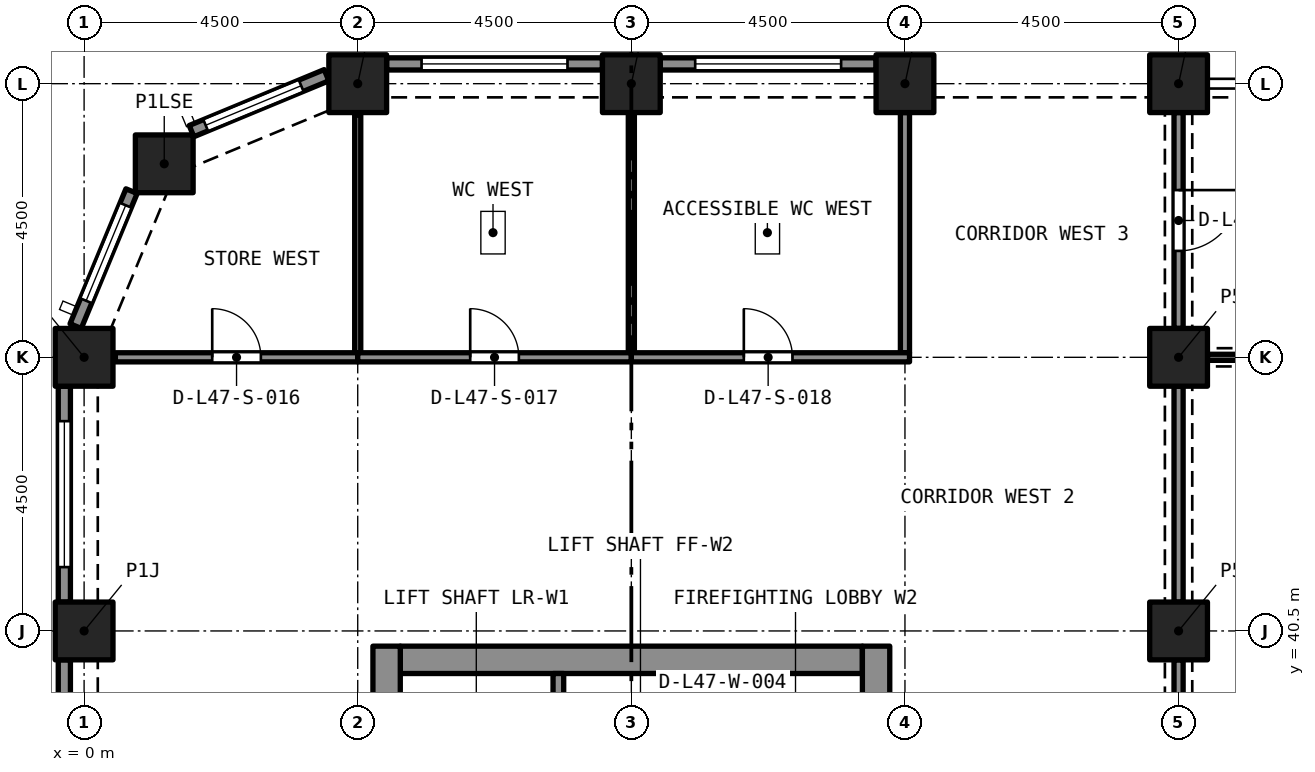
"""IFC4 building model, lengths in metres.
Left out: names, types, materials, properties, quantities, classifications, styles, units other than length and angle.
Written with IfcOpenShell. Run it as: python <this file> out.ifc"""

import sys

from ifc_helpers import new_model, si_unit, direction, frame, frame_2d, origin, origin_2d, place, context, subcontext, project, spatial, rectangle, extrude, element, fill, save


model = new_model("IFC4")
c1 = context("Model", 3, precision=1e-05, world=origin(), true_north=direction((0.0, 1.0)))
c2 = subcontext(c1, "Body", "Model", "MODEL_VIEW")
j1 = project(units=[si_unit("LENGTHUNIT", "METRE"), si_unit("PLANEANGLEUNIT", "RADIAN")], contexts=[c1])
p1 = place(None, origin())
s1 = spatial("IfcSite", under=j1, at=p1, CompositionType="ELEMENT")
p2 = place(p1, origin())
s2 = spatial("IfcBuilding", under=s1, at=p2, CompositionType="ELEMENT")
p3 = place(p2, frame((0.0, 0.0, 172.6)))
s3 = spatial("IfcBuildingStorey", under=s2, at=p3, CompositionType="ELEMENT", Elevation=172.6)
for number, where, z_axis, x_axis in (
    (1, (0.0, 40.5, 0.0), (0.0, 0.0, 1.0), (1.0, 0.0, 0.0)),
    (2, (18.0, 40.5, 0.0), (0.0, 0.0, 1.0), (1.0, 0.0, 0.0)),
    (3, (0.0, 45.0, 0.0), (0.0, 0.0, 1.0), (1.0, 0.0, 0.0)),
    (4, (18.0, 45.0, 0.0), (0.0, 0.0, 1.0), (1.0, 0.0, 0.0)),
    (5, (1.318, 48.182, 0.0), (0.0, 0.0, 1.0), (1.0, 0.0, 0.0)),
    (6, (4.5, 49.5, 0.0), (0.0, 0.0, 1.0), (1.0, 0.0, 0.0)),
    (7, (9.0, 49.5, 0.0), (0.0, 0.0, 1.0), (1.0, 0.0, 0.0)),
    (8, (13.5, 49.5, 0.0), (0.0, 0.0, 1.0), (1.0, 0.0, 0.0)),
    (9, (18.0, 49.5, 0.0), (0.0, 0.0, 1.0), (1.0, 0.0, 0.0)),
):
    element("IfcColumn", number, at=place(p3, frame(where, z_axis=z_axis, x_axis=x_axis)), inside=s3, PredefinedType="COLUMN", context=c2, shape_type="SweptSolid", body=[
        extrude(rectangle(XDim=0.95, YDim=0.95, at=origin_2d()), origin(), (0.0, 0.0, 1.0), 3.7),
    ])
p4 = place(p3, frame((5.2, 40.025, 0.0), z_axis=(0.0, 0.0, 1.0), x_axis=(1.0, 0.0, 0.0)))
e10 = element("IfcWall", 10, at=p4, inside=s3, PredefinedType="SOLIDWALL", context=c2, shape_type="SweptSolid", body=[
    extrude(rectangle(XDim=7.6, YDim=0.45, at=frame_2d((3.8, 0.0))), origin(), (0.0, 0.0, 1.0), 3.7),
])
p5 = place(p3, frame((4.975, 27.25, 0.0), z_axis=(0.0, 0.0, 1.0), x_axis=(0.0, 1.0, 0.0)))
e11 = element("IfcWall", 11, at=p5, inside=s3, PredefinedType="SOLIDWALL", context=c2, shape_type="SweptSolid", body=[
    extrude(rectangle(XDim=13.0, YDim=0.45, at=frame_2d((6.5, 0.0))), origin(), (0.0, 0.0, 1.0), 3.7),
])
p6 = place(p5, frame((8.7, 0.0, 0.0)))
e12 = element("IfcOpeningElement", 12, at=p6, cuts=e11, PredefinedType="OPENING", context=c2, shape_type="SweptSolid", body=[
    extrude(rectangle(XDim=1.2, YDim=2.1, at=frame_2d((0.6, 1.05))), frame((0.0, 0.235, 0.0), z_axis=(0.0, -1.0, 0.0), x_axis=(1.0, 0.0, 0.0)), (0.0, 0.0, 1.0), 0.47),
])
p7 = place(p3, frame((13.025, 27.25, 0.0), z_axis=(0.0, 0.0, 1.0), x_axis=(0.0, 1.0, 0.0)))
e13 = element("IfcWall", 13, at=p7, inside=s3, PredefinedType="SOLIDWALL", context=c2, shape_type="SweptSolid", body=[
    extrude(rectangle(XDim=13.0, YDim=0.45, at=frame_2d((6.5, 0.0))), origin(), (0.0, 0.0, 1.0), 3.7),
])
p8 = place(p7, frame((10.85, 0.0, 0.0)))
e14 = element("IfcOpeningElement", 14, at=p8, cuts=e13, PredefinedType="OPENING", context=c2, shape_type="SweptSolid", body=[
    extrude(rectangle(XDim=1.1, YDim=2.1, at=frame_2d((0.55, 1.05))), frame((0.0, 0.235, 0.0), z_axis=(0.0, -1.0, 0.0), x_axis=(1.0, 0.0, 0.0)), (0.0, 0.0, 1.0), 0.47),
])
p9 = place(p7, frame((8.7, 0.0, 0.0)))
e15 = element("IfcOpeningElement", 15, at=p9, cuts=e13, PredefinedType="OPENING", context=c2, shape_type="SweptSolid", body=[
    extrude(rectangle(XDim=1.2, YDim=2.1, at=frame_2d((0.6, 1.05))), frame((0.0, 0.235, 0.0), z_axis=(0.0, -1.0, 0.0), x_axis=(1.0, 0.0, 0.0)), (0.0, 0.0, 1.0), 0.47),
])
p10 = place(p3, frame((9.475, 49.825, 0.0), z_axis=(0.0, 0.0, 1.0), x_axis=(1.0, 0.0, 0.0)))
e16 = element("IfcWall", 16, at=p10, inside=s3, PredefinedType="SOLIDWALL", context=c2, shape_type="SweptSolid", body=[
    extrude(rectangle(XDim=3.55, YDim=0.2, at=frame_2d((1.775, 0.0))), origin(), (0.0, 0.0, 1.0), 3.7),
])
p11 = place(p10, frame((0.575, 0.0, 0.45)))
e17 = element("IfcOpeningElement", 17, at=p11, cuts=e16, PredefinedType="OPENING", context=c2, shape_type="SweptSolid", body=[
    extrude(rectangle(XDim=2.4, YDim=1.95, at=frame_2d((1.2, 0.975))), frame((0.0, 0.11, 0.0), z_axis=(0.0, -1.0, 0.0), x_axis=(1.0, 0.0, 0.0)), (0.0, 0.0, 1.0), 0.22),
])
p12 = place(p3, frame((4.975, 49.825, 0.0), z_axis=(0.0, 0.0, 1.0), x_axis=(1.0, 0.0, 0.0)))
e18 = element("IfcWall", 18, at=p12, inside=s3, PredefinedType="SOLIDWALL", context=c2, shape_type="SweptSolid", body=[
    extrude(rectangle(XDim=3.55, YDim=0.2, at=frame_2d((1.775, 0.0))), origin(), (0.0, 0.0, 1.0), 3.7),
])
p13 = place(p12, frame((0.575, 0.0, 0.45)))
e19 = element("IfcOpeningElement", 19, at=p13, cuts=e18, PredefinedType="OPENING", context=c2, shape_type="SweptSolid", body=[
    extrude(rectangle(XDim=2.4, YDim=1.95, at=frame_2d((1.2, 0.975))), frame((0.0, 0.11, 0.0), z_axis=(0.0, -1.0, 0.0), x_axis=(1.0, 0.0, 0.0)), (0.0, 0.0, 1.0), 0.22),
])
p14 = place(p3, frame((1.767, 48.72, 0.0), z_axis=(0.0, 0.0, 1.0), x_axis=(0.923880599843, 0.382680855588, 0.0)))
e20 = element("IfcWall", 20, at=p14, inside=s3, PredefinedType="SOLIDWALL", context=c2, shape_type="SweptSolid", body=[
    extrude(rectangle(XDim=2.403, YDim=0.2, at=frame_2d((1.201, 0.0))), origin(), (0.0, 0.0, 1.0), 3.7),
])
p15 = place(p14, frame((0.251, 0.0, 0.45)))
e21 = element("IfcOpeningElement", 21, at=p15, cuts=e20, PredefinedType="OPENING", context=c2, shape_type="SweptSolid", body=[
    extrude(rectangle(XDim=1.7, YDim=1.95, at=frame_2d((0.85, 0.975))), frame((0.0, 0.11, 0.0), z_axis=(0.0, -1.0, 0.0), x_axis=(1.0, 0.0, 0.0)), (0.0, 0.0, 1.0), 0.22),
])
p16 = place(p3, frame((-0.139, 45.513, 0.0), z_axis=(0.0, 0.0, 1.0), x_axis=(0.382680855588, 0.923880599843, 0.0)))
e22 = element("IfcWall", 22, at=p16, inside=s3, PredefinedType="SOLIDWALL", context=c2, shape_type="SweptSolid", body=[
    extrude(rectangle(XDim=2.403, YDim=0.2, at=frame_2d((1.201, 0.0))), origin(), (0.0, 0.0, 1.0), 3.7),
])
p17 = place(p16, frame((0.451, 0.0, 0.45)))
e23 = element("IfcOpeningElement", 23, at=p17, cuts=e22, PredefinedType="OPENING", context=c2, shape_type="SweptSolid", body=[
    extrude(rectangle(XDim=1.7, YDim=1.95, at=frame_2d((0.85, 0.975))), frame((0.0, 0.11, 0.0), z_axis=(0.0, -1.0, 0.0), x_axis=(1.0, 0.0, 0.0)), (0.0, 0.0, 1.0), 0.22),
])
p18 = place(p3, frame((-0.325, 40.975, 0.0), z_axis=(0.0, 0.0, 1.0), x_axis=(0.0, 1.0, 0.0)))
e24 = element("IfcWall", 24, at=p18, inside=s3, PredefinedType="SOLIDWALL", context=c2, shape_type="SweptSolid", body=[
    extrude(rectangle(XDim=3.55, YDim=0.2, at=frame_2d((1.775, 0.0))), origin(), (0.0, 0.0, 1.0), 3.7),
])
p19 = place(p18, frame((0.575, 0.0, 0.45)))
e25 = element("IfcOpeningElement", 25, at=p19, cuts=e24, PredefinedType="OPENING", context=c2, shape_type="SweptSolid", body=[
    extrude(rectangle(XDim=2.4, YDim=1.95, at=frame_2d((1.2, 0.975))), frame((0.0, 0.11, 0.0), z_axis=(0.0, -1.0, 0.0), x_axis=(1.0, 0.0, 0.0)), (0.0, 0.0, 1.0), 0.22),
])
p20 = place(p3, frame((-0.325, 36.475, 0.0), z_axis=(0.0, 0.0, 1.0), x_axis=(0.0, 1.0, 0.0)))
e26 = element("IfcWall", 26, at=p20, inside=s3, PredefinedType="SOLIDWALL", context=c2, shape_type="SweptSolid", body=[
    extrude(rectangle(XDim=3.55, YDim=0.2, at=frame_2d((1.775, 0.0))), origin(), (0.0, 0.0, 1.0), 3.7),
])
p21 = place(p20, frame((0.575, 0.0, 0.45)))
e27 = element("IfcOpeningElement", 27, at=p21, cuts=e26, PredefinedType="OPENING", context=c2, shape_type="SweptSolid", body=[
    extrude(rectangle(XDim=2.4, YDim=1.95, at=frame_2d((1.2, 0.975))), frame((0.0, 0.11, 0.0), z_axis=(0.0, -1.0, 0.0), x_axis=(1.0, 0.0, 0.0)), (0.0, 0.0, 1.0), 0.22),
])
p22 = place(p3, frame((7.8, 37.5, 0.0), z_axis=(0.0, 0.0, 1.0), x_axis=(0.0, 1.0, 0.0)))
e28 = element("IfcWall", 28, at=p22, inside=s3, PredefinedType="SOLIDWALL", context=c2, shape_type="SweptSolid", body=[
    extrude(rectangle(XDim=2.3, YDim=0.175, at=frame_2d((1.15, 0.0))), origin(), (0.0, 0.0, 1.0), 3.4),
])
p23 = place(p3, frame((10.5, 37.5, 0.0), z_axis=(0.0, 0.0, 1.0), x_axis=(0.0, 1.0, 0.0)))
e29 = element("IfcWall", 29, at=p23, inside=s3, PredefinedType="SOLIDWALL", context=c2, shape_type="SweptSolid", body=[
    extrude(rectangle(XDim=2.3, YDim=0.175, at=frame_2d((1.15, 0.0))), origin(), (0.0, 0.0, 1.0), 3.4),
])
p24 = place(p23, frame((0.65, 0.0, 0.0)))
e30 = element("IfcOpeningElement", 30, at=p24, cuts=e29, PredefinedType="OPENING", context=c2, shape_type="SweptSolid", body=[
    extrude(rectangle(XDim=1.0, YDim=2.1, at=frame_2d((0.5, 1.05))), frame((0.0, 0.097, 0.0), z_axis=(0.0, -1.0, 0.0), x_axis=(1.0, 0.0, 0.0)), (0.0, 0.0, 1.0), 0.195),
])
p25 = place(p3, frame((18.475, 45.0, 0.0), z_axis=(0.0, 0.0, 1.0), x_axis=(1.0, 0.0, 0.0)))
e31 = element("IfcWall", 31, at=p25, inside=s3, PredefinedType="PARTITIONING", context=c2, shape_type="SweptSolid", body=[
    extrude(rectangle(XDim=12.55, YDim=0.1, at=frame_2d((6.275, 0.0))), origin(), (0.0, 0.0, 1.0), 3.25),
])
p26 = place(p3, frame((18.0, 40.025, 0.0), z_axis=(0.0, 0.0, 1.0), x_axis=(0.0, -1.0, 0.0)))
e32 = element("IfcWall", 32, at=p26, inside=s3, PredefinedType="PARTITIONING", context=c2, shape_type="SweptSolid", body=[
    extrude(rectangle(XDim=3.55, YDim=0.15, at=frame_2d((1.775, 0.0))), origin(), (0.0, 0.0, 1.0), 2.88),
])
p27 = place(p26, frame((1.275, 0.0, 0.0)))
e33 = element("IfcOpeningElement", 33, at=p27, cuts=e32, PredefinedType="OPENING", context=c2, shape_type="SweptSolid", body=[
    extrude(rectangle(XDim=1.0, YDim=2.1, at=frame_2d((0.5, 1.05))), frame((0.0, 0.085, 0.0), z_axis=(0.0, -1.0, 0.0), x_axis=(1.0, 0.0, 0.0)), (0.0, 0.0, 1.0), 0.17),
])
p28 = place(p3, frame((18.0, 40.975, 0.0), z_axis=(0.0, 0.0, 1.0), x_axis=(0.0, 1.0, 0.0)))
e34 = element("IfcWall", 34, at=p28, inside=s3, PredefinedType="PARTITIONING", context=c2, shape_type="SweptSolid", body=[
    extrude(rectangle(XDim=3.55, YDim=0.15, at=frame_2d((1.775, 0.0))), origin(), (0.0, 0.0, 1.0), 2.88),
])
p29 = place(p3, frame((18.0, 49.025, 0.0), z_axis=(0.0, 0.0, 1.0), x_axis=(0.0, -1.0, 0.0)))
e35 = element("IfcWall", 35, at=p29, inside=s3, PredefinedType="PARTITIONING", context=c2, shape_type="SweptSolid", body=[
    extrude(rectangle(XDim=3.55, YDim=0.15, at=frame_2d((1.775, 0.0))), origin(), (0.0, 0.0, 1.0), 2.88),
])
p30 = place(p29, frame((1.275, 0.0, 0.0)))
e36 = element("IfcOpeningElement", 36, at=p30, cuts=e35, PredefinedType="OPENING", context=c2, shape_type="SweptSolid", body=[
    extrude(rectangle(XDim=1.0, YDim=2.1, at=frame_2d((0.5, 1.05))), frame((0.0, 0.085, 0.0), z_axis=(0.0, -1.0, 0.0), x_axis=(1.0, 0.0, 0.0)), (0.0, 0.0, 1.0), 0.17),
])
p31 = place(p3, frame((4.5, 45.075, 0.0), z_axis=(0.0, 0.0, 1.0), x_axis=(0.0, 1.0, 0.0)))
e37 = element("IfcWall", 37, at=p31, inside=s3, PredefinedType="PARTITIONING", context=c2, shape_type="SweptSolid", body=[
    extrude(rectangle(XDim=3.911, YDim=0.1, at=frame_2d((1.956, 0.0))), origin(), (0.0, 0.0, 1.0), 3.4),
])
p32 = place(p3, frame((0.514, 45.0, 0.0), z_axis=(0.0, 0.0, 1.0), x_axis=(1.0, 0.0, 0.0)))
e38 = element("IfcWall", 38, at=p32, inside=s3, PredefinedType="PARTITIONING", context=c2, shape_type="SweptSolid", body=[
    extrude(rectangle(XDim=3.986, YDim=0.15, at=frame_2d((1.993, 0.0))), origin(), (0.0, 0.0, 1.0), 3.4),
])
p33 = place(p32, frame((1.593, 0.0, 0.0)))
e39 = element("IfcOpeningElement", 39, at=p33, cuts=e38, PredefinedType="OPENING", context=c2, shape_type="SweptSolid", body=[
    extrude(rectangle(XDim=0.8, YDim=2.1, at=frame_2d((0.4, 1.05))), frame((0.0, 0.085, 0.0), z_axis=(0.0, -1.0, 0.0), x_axis=(1.0, 0.0, 0.0)), (0.0, 0.0, 1.0), 0.17),
])
p34 = place(p3, frame((9.0, 45.075, 0.0), z_axis=(0.0, 0.0, 1.0), x_axis=(0.0, 1.0, 0.0)))
e40 = element("IfcWall", 40, at=p34, inside=s3, PredefinedType="PARTITIONING", context=c2, shape_type="SweptSolid", body=[
    extrude(rectangle(XDim=3.95, YDim=0.1, at=frame_2d((1.975, 0.0))), origin(), (0.0, 0.0, 1.0), 3.4),
])
p35 = place(p3, frame((4.5, 45.0, 0.0), z_axis=(0.0, 0.0, 1.0), x_axis=(1.0, 0.0, 0.0)))
e41 = element("IfcWall", 41, at=p35, inside=s3, PredefinedType="PARTITIONING", context=c2, shape_type="SweptSolid", body=[
    extrude(rectangle(XDim=4.5, YDim=0.15, at=frame_2d((2.25, 0.0))), origin(), (0.0, 0.0, 1.0), 3.4),
])
p36 = place(p35, frame((1.85, 0.0, 0.0)))
e42 = element("IfcOpeningElement", 42, at=p36, cuts=e41, PredefinedType="OPENING", context=c2, shape_type="SweptSolid", body=[
    extrude(rectangle(XDim=0.8, YDim=2.1, at=frame_2d((0.4, 1.05))), frame((0.0, 0.085, 0.0), z_axis=(0.0, -1.0, 0.0), x_axis=(1.0, 0.0, 0.0)), (0.0, 0.0, 1.0), 0.17),
])
p37 = place(p3, frame((13.5, 45.075, 0.0), z_axis=(0.0, 0.0, 1.0), x_axis=(0.0, 1.0, 0.0)))
e43 = element("IfcWall", 43, at=p37, inside=s3, PredefinedType="PARTITIONING", context=c2, shape_type="SweptSolid", body=[
    extrude(rectangle(XDim=3.95, YDim=0.15, at=frame_2d((1.975, 0.0))), origin(), (0.0, 0.0, 1.0), 3.4),
])
p38 = place(p3, frame((9.0, 45.0, 0.0), z_axis=(0.0, 0.0, 1.0), x_axis=(1.0, 0.0, 0.0)))
e44 = element("IfcWall", 44, at=p38, inside=s3, PredefinedType="PARTITIONING", context=c2, shape_type="SweptSolid", body=[
    extrude(rectangle(XDim=4.575, YDim=0.15, at=frame_2d((2.288, 0.0))), origin(), (0.0, 0.0, 1.0), 3.4),
])
p39 = place(p38, frame((1.85, 0.0, 0.0)))
e45 = element("IfcOpeningElement", 45, at=p39, cuts=e44, PredefinedType="OPENING", context=c2, shape_type="SweptSolid", body=[
    extrude(rectangle(XDim=0.8, YDim=2.1, at=frame_2d((0.4, 1.05))), frame((0.0, 0.085, 0.0), z_axis=(0.0, -1.0, 0.0), x_axis=(1.0, 0.0, 0.0)), (0.0, 0.0, 1.0), 0.17),
])
p40 = place(p11, origin())
e46 = element("IfcWindow", 46, at=p40, inside=s3, PartitioningType="SINGLE_PANEL", PredefinedType="WINDOW", context=c2, shape_type="SweptSolid", body=[
    extrude(rectangle(XDim=2.4, YDim=1.95, at=frame_2d((1.2, 0.975))), frame((0.0, 0.03, 0.0), z_axis=(0.0, -1.0, 0.0), x_axis=(1.0, 0.0, 0.0)), (0.0, 0.0, 1.0), 0.06),
])
fill(e17, e46)
p41 = place(p13, origin())
e47 = element("IfcWindow", 47, at=p41, inside=s3, PartitioningType="SINGLE_PANEL", PredefinedType="WINDOW", context=c2, shape_type="SweptSolid", body=[
    extrude(rectangle(XDim=2.4, YDim=1.95, at=frame_2d((1.2, 0.975))), frame((0.0, 0.03, 0.0), z_axis=(0.0, -1.0, 0.0), x_axis=(1.0, 0.0, 0.0)), (0.0, 0.0, 1.0), 0.06),
])
fill(e19, e47)
p42 = place(p15, origin())
e48 = element("IfcWindow", 48, at=p42, inside=s3, PartitioningType="SINGLE_PANEL", PredefinedType="WINDOW", context=c2, shape_type="SweptSolid", body=[
    extrude(rectangle(XDim=1.7, YDim=1.95, at=frame_2d((0.85, 0.975))), frame((0.0, 0.03, 0.0), z_axis=(0.0, -1.0, 0.0), x_axis=(1.0, 0.0, 0.0)), (0.0, 0.0, 1.0), 0.06),
])
fill(e21, e48)
p43 = place(p17, origin())
e49 = element("IfcWindow", 49, at=p43, inside=s3, PartitioningType="SINGLE_PANEL", PredefinedType="WINDOW", context=c2, shape_type="SweptSolid", body=[
    extrude(rectangle(XDim=1.7, YDim=1.95, at=frame_2d((0.85, 0.975))), frame((0.0, 0.03, 0.0), z_axis=(0.0, -1.0, 0.0), x_axis=(1.0, 0.0, 0.0)), (0.0, 0.0, 1.0), 0.06),
])
fill(e23, e49)
p44 = place(p19, origin())
e50 = element("IfcWindow", 50, at=p44, inside=s3, PartitioningType="SINGLE_PANEL", PredefinedType="WINDOW", context=c2, shape_type="SweptSolid", body=[
    extrude(rectangle(XDim=2.4, YDim=1.95, at=frame_2d((1.2, 0.975))), frame((0.0, 0.03, 0.0), z_axis=(0.0, -1.0, 0.0), x_axis=(1.0, 0.0, 0.0)), (0.0, 0.0, 1.0), 0.06),
])
fill(e25, e50)
p45 = place(p30, origin())
e51 = element("IfcDoor", 51, at=p45, inside=s3, OperationType="SINGLE_SWING_RIGHT", PredefinedType="DOOR", context=c2, shape_type="SweptSolid", body=[
    extrude(rectangle(XDim=1.0, YDim=2.1, at=frame_2d((0.5, 1.05))), frame((0.0, 0.025, 0.0), z_axis=(0.0, -1.0, 0.0), x_axis=(1.0, 0.0, 0.0)), (0.0, 0.0, 1.0), 0.05),
])
fill(e36, e51)
p46 = place(p33, origin())
e52 = element("IfcDoor", 52, at=p46, inside=s3, OperationType="SINGLE_SWING_LEFT", PredefinedType="DOOR", context=c2, shape_type="SweptSolid", body=[
    extrude(rectangle(XDim=0.8, YDim=2.1, at=frame_2d((0.4, 1.05))), frame((0.0, 0.025, 0.0), z_axis=(0.0, -1.0, 0.0), x_axis=(1.0, 0.0, 0.0)), (0.0, 0.0, 1.0), 0.05),
])
fill(e39, e52)
p47 = place(p36, origin())
e53 = element("IfcDoor", 53, at=p47, inside=s3, OperationType="SINGLE_SWING_RIGHT", PredefinedType="DOOR", context=c2, shape_type="SweptSolid", body=[
    extrude(rectangle(XDim=0.8, YDim=2.1, at=frame_2d((0.4, 1.05))), frame((0.0, 0.025, 0.0), z_axis=(0.0, -1.0, 0.0), x_axis=(1.0, 0.0, 0.0)), (0.0, 0.0, 1.0), 0.05),
])
fill(e42, e53)
p48 = place(p39, origin())
e54 = element("IfcDoor", 54, at=p48, inside=s3, OperationType="SINGLE_SWING_LEFT", PredefinedType="DOOR", context=c2, shape_type="SweptSolid", body=[
    extrude(rectangle(XDim=0.8, YDim=2.1, at=frame_2d((0.4, 1.05))), frame((0.0, 0.025, 0.0), z_axis=(0.0, -1.0, 0.0), x_axis=(1.0, 0.0, 0.0)), (0.0, 0.0, 1.0), 0.05),
])
fill(e45, e54)
save(model, sys.argv[1])
